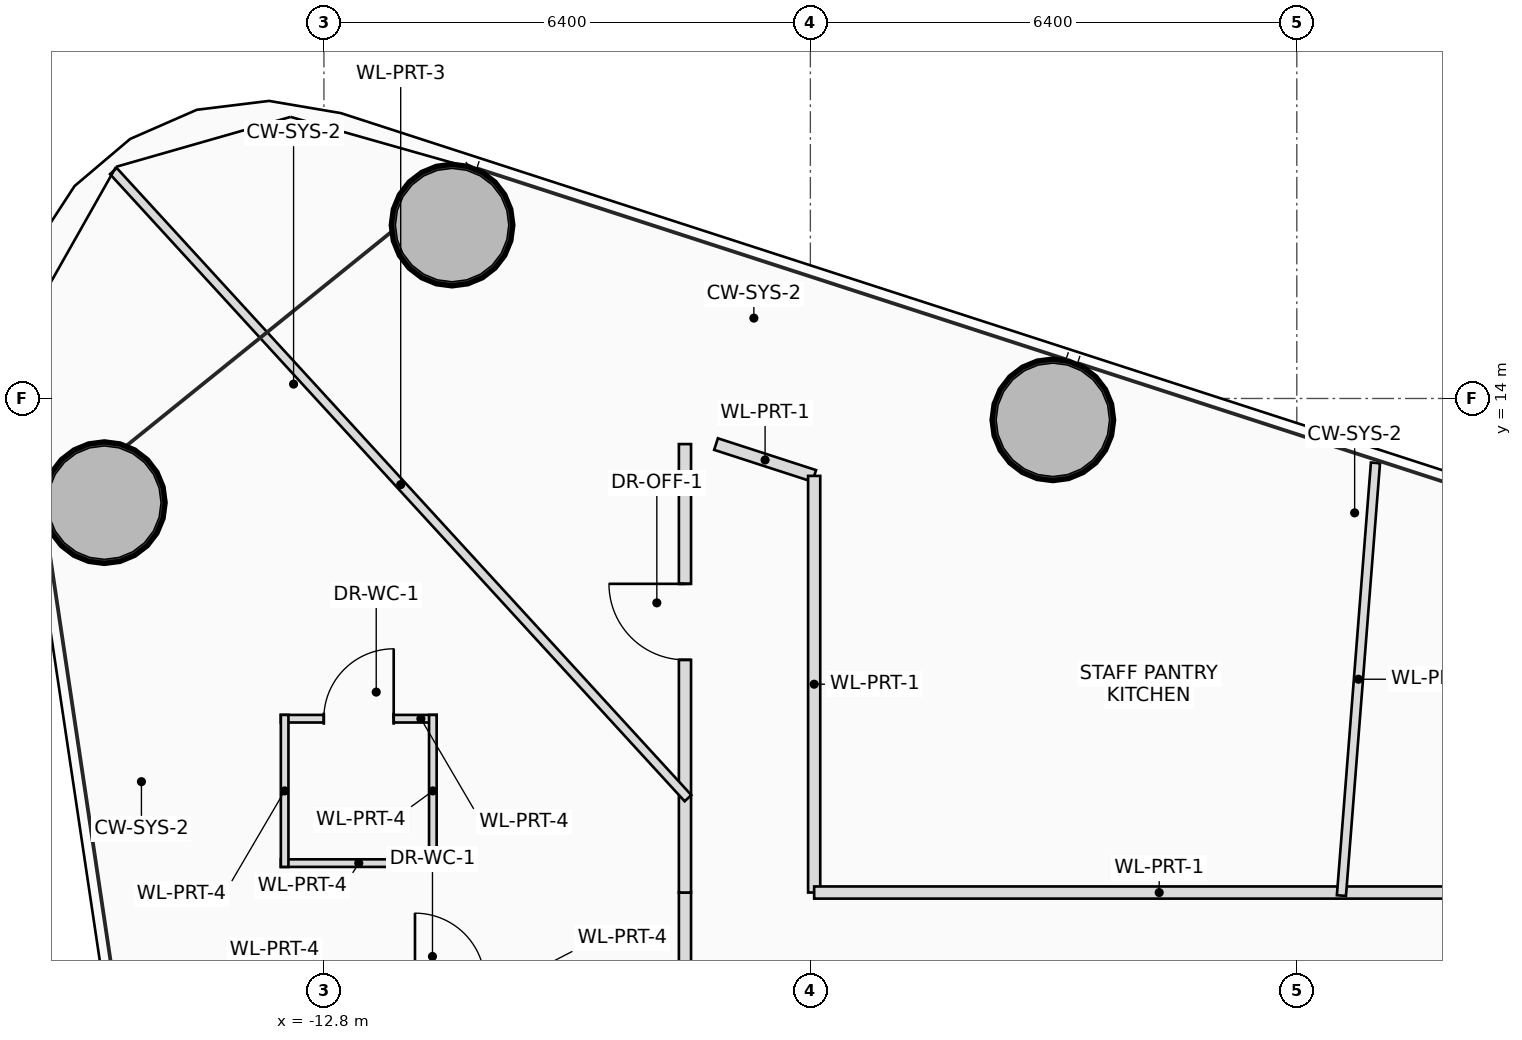
"""IFC4 building model, lengths in metres.
Left out: names, types, materials, properties, quantities, classifications, styles, units other than length and angle.
Written with IfcOpenShell. Run it as: python <this file> out.ifc"""

import sys

from ifc_helpers import new_model, si_unit, direction, frame, frame_2d, origin, origin_2d, place, context, subcontext, project, spatial, rectangle, hollow_circle, extrude, source, transform, mapped, element, fill, save


model = new_model("IFC4")
c1 = context("Model", 3, precision=1e-05, world=origin(), true_north=direction((0.0, 1.0)))
c2 = subcontext(c1, "Body", "Model", "MODEL_VIEW")
j1 = project(units=[si_unit("LENGTHUNIT", "METRE"), si_unit("PLANEANGLEUNIT", "RADIAN")], contexts=[c1])
p1 = place(None, origin())
s1 = spatial("IfcSite", under=j1, at=p1, CompositionType="ELEMENT")
p2 = place(p1, origin())
s2 = spatial("IfcBuilding", under=s1, at=p2, CompositionType="ELEMENT")
p3 = place(p2, frame((0.0, 0.0, 62.3)))
s3 = spatial("IfcBuildingStorey", under=s2, at=p3, CompositionType="ELEMENT", Elevation=62.3)
m1 = source(origin(), c2, "Body", "SweptSolid", [
    extrude(hollow_circle(Radius=0.8, WallThickness=0.055, at=origin_2d()), origin(), (0.0, 0.0, 1.0), 3.75),
])
for number, where, z_axis, x_axis in (
    (1, (-3.21, 13.719, 0.0), (0.0, 0.0, 1.0), (1.0, 0.0, 0.0)),
    (2, (-11.114, 16.281, 0.0), (0.0, 0.0, 1.0), (1.0, 0.0, 0.0)),
    (3, (-15.689, 12.629, 0.0), (0.0, 0.0, 1.0), (1.0, 0.0, 0.0)),
):
    element("IfcColumn", number, at=place(p3, frame(where, z_axis=z_axis, x_axis=x_axis)), inside=s3, PredefinedType="COLUMN", context=c2, shape_type="MappedRepresentation", body=[
        mapped(m1, transform((0.0, 0.0, 0.0), scale=1.0)),
    ])
p4 = place(p3, frame((-13.367, 9.787, 0.0), z_axis=(0.0, 0.0, 1.0), x_axis=(1.0, 0.0, 0.0)))
e4 = element("IfcWall", 4, at=p4, inside=s3, PredefinedType="PARTITIONING", context=c2, shape_type="SweptSolid", body=[
    extrude(rectangle(XDim=2.05, YDim=0.1, at=frame_2d((1.025, 0.0))), origin(), (0.0, 0.0, 1.0), 2.85),
])
p5 = place(p4, frame((0.565, 0.0, 0.0)))
e5 = element("IfcOpeningElement", 5, at=p5, cuts=e4, PredefinedType="OPENING", context=c2, shape_type="SweptSolid", body=[
    extrude(rectangle(XDim=0.92, YDim=2.1, at=frame_2d((0.46, 1.05))), frame((0.0, 0.06, 0.0), z_axis=(0.0, -1.0, 0.0), x_axis=(1.0, 0.0, 0.0)), (0.0, 0.0, 1.0), 0.12),
])
p6 = place(p3, frame((-11.317, 7.887, 0.0), z_axis=(0.0, 0.0, 1.0), x_axis=(-1.0, 0.0, 0.0)))
e6 = element("IfcWall", 6, at=p6, inside=s3, PredefinedType="PARTITIONING", context=c2, shape_type="SweptSolid", body=[
    extrude(rectangle(XDim=2.05, YDim=0.1, at=frame_2d((1.025, 0.0))), origin(), (0.0, 0.0, 1.0), 3.2),
])
p7 = place(p3, frame((-11.367, 9.837, 0.0), z_axis=(0.0, 0.0, 1.0), x_axis=(0.0, -1.0, 0.0)))
e7 = element("IfcWall", 7, at=p7, inside=s3, PredefinedType="PARTITIONING", context=c2, shape_type="SweptSolid", body=[
    extrude(rectangle(XDim=2.0, YDim=0.1, at=frame_2d((1.0, 0.0))), origin(), (0.0, 0.0, 1.0), 2.85),
])
p8 = place(p3, frame((-13.317, 7.837, 0.0), z_axis=(0.0, 0.0, 1.0), x_axis=(0.0, 1.0, 0.0)))
e8 = element("IfcWall", 8, at=p8, inside=s3, PredefinedType="PARTITIONING", context=c2, shape_type="SweptSolid", body=[
    extrude(rectangle(XDim=2.0, YDim=0.1, at=frame_2d((1.0, 0.0))), origin(), (0.0, 0.0, 1.0), 3.545),
])
p9 = place(p3, frame((-8.05, -7.5, 0.0), z_axis=(0.0, 0.0, 1.0), x_axis=(0.0, 1.0, 0.0)))
e9 = element("IfcWall", 9, at=p9, inside=s3, PredefinedType="PARTITIONING", context=c2, shape_type="SweptSolid", body=[
    extrude(rectangle(XDim=15.0, YDim=0.16, at=frame_2d((7.5, 0.0))), origin(), (0.0, 0.0, 1.0), 2.85),
])
p10 = place(p9, frame((8.806, 0.0, 0.0)))
e10 = element("IfcOpeningElement", 10, at=p10, cuts=e9, PredefinedType="OPENING", context=c2, shape_type="SweptSolid", body=[
    extrude(rectangle(XDim=1.0, YDim=2.25, at=frame_2d((0.5, 1.125))), frame((0.0, 0.09, 0.0), z_axis=(0.0, -1.0, 0.0), x_axis=(1.0, 0.0, 0.0)), (0.0, 0.0, 1.0), 0.18),
])
p11 = place(p3, frame((-8.05, 7.5, 0.0), z_axis=(0.0, 0.0, 1.0), x_axis=(0.0, 1.0, 0.0)))
e11 = element("IfcWall", 11, at=p11, inside=s3, PredefinedType="PARTITIONING", context=c2, shape_type="SweptSolid", body=[
    extrude(rectangle(XDim=5.9, YDim=0.16, at=frame_2d((2.95, 0.0))), origin(), (0.0, 0.0, 1.0), 2.85),
])
p12 = place(p11, frame((3.061, 0.0, 0.0)))
e12 = element("IfcOpeningElement", 12, at=p12, cuts=e11, PredefinedType="OPENING", context=c2, shape_type="SweptSolid", body=[
    extrude(rectangle(XDim=1.0, YDim=2.25, at=frame_2d((0.5, 1.125))), frame((0.0, 0.09, 0.0), z_axis=(0.0, -1.0, 0.0), x_axis=(1.0, 0.0, 0.0)), (0.0, 0.0, 1.0), 0.18),
])
p13 = place(p3, frame((-7.641, 13.4, 0.0), z_axis=(0.0, 0.0, 1.0), x_axis=(0.951277022007, -0.308337521884, 0.0)))
e13 = element("IfcWall", 13, at=p13, inside=s3, PredefinedType="PARTITIONING", context=c2, shape_type="SweptSolid", body=[
    extrude(rectangle(XDim=1.357, YDim=0.16, at=frame_2d((0.679, 0.0))), origin(), (0.0, 0.0, 1.0), 3.545),
])
p14 = place(p3, frame((-6.35, 12.981, 0.0), z_axis=(0.0, 0.0, 1.0), x_axis=(0.0, -1.0, 0.0)))
e14 = element("IfcWall", 14, at=p14, inside=s3, PredefinedType="PARTITIONING", context=c2, shape_type="SweptSolid", body=[
    extrude(rectangle(XDim=5.481, YDim=0.16, at=frame_2d((2.741, 0.0))), origin(), (0.0, 0.0, 1.0), 3.05),
])
p15 = place(p3, frame((-6.35, 7.5, 0.0), z_axis=(0.0, 0.0, 1.0), x_axis=(1.0, 0.0, 0.0)))
e15 = element("IfcWall", 15, at=p15, inside=s3, PredefinedType="PARTITIONING", context=c2, shape_type="SweptSolid", body=[
    extrude(rectangle(XDim=12.7, YDim=0.16, at=frame_2d((6.35, 0.0))), origin(), (0.0, 0.0, 1.0), 2.85),
])
p16 = place(p15, frame((9.229, 0.0, 0.0)))
e16 = element("IfcOpeningElement", 16, at=p16, cuts=e15, PredefinedType="OPENING", context=c2, shape_type="SweptSolid", body=[
    extrude(rectangle(XDim=1.0, YDim=2.25, at=frame_2d((0.5, 1.125))), frame((0.0, 0.09, 0.0), z_axis=(0.0, -1.0, 0.0), x_axis=(1.0, 0.0, 0.0)), (0.0, 0.0, 1.0), 0.18),
])
p17 = place(p3, frame((0.587, 7.46, 0.0), z_axis=(0.0, 0.0, 1.0), x_axis=(0.078455369282, 0.996917627004, 0.0)))
e17 = element("IfcWall", 17, at=p17, inside=s3, PredefinedType="PARTITIONING", context=c2, shape_type="SweptSolid", body=[
    extrude(rectangle(XDim=5.71, YDim=0.12, at=frame_2d((2.855, 0.0))), origin(), (0.0, 0.0, 1.0), 3.01),
])
p18 = place(p3, frame((-8.01, 8.741, 0.0), z_axis=(0.0, 0.0, 1.0), x_axis=(-0.675595196102, 0.737272765674, 0.0)))
e18 = element("IfcWall", 18, at=p18, inside=s3, PredefinedType="PARTITIONING", context=c2, shape_type="SweptSolid", body=[
    extrude(rectangle(XDim=11.19, YDim=0.12, at=frame_2d((5.595, 0.0))), origin(), (0.0, 0.0, 1.0), 3.01),
])
p19 = place(p5, origin())
e19 = element("IfcDoor", 19, at=p19, inside=s3, OperationType="SINGLE_SWING_RIGHT", PredefinedType="DOOR", context=c2, shape_type="SweptSolid", body=[
    extrude(rectangle(XDim=0.92, YDim=2.1, at=frame_2d((0.46, 1.05))), frame((0.0, 0.025, 0.0), z_axis=(0.0, -1.0, 0.0), x_axis=(1.0, 0.0, 0.0)), (0.0, 0.0, 1.0), 0.05),
])
fill(e5, e19)
p20 = place(p12, origin())
e20 = element("IfcDoor", 20, at=p20, inside=s3, OperationType="SINGLE_SWING_RIGHT", PredefinedType="DOOR", context=c2, shape_type="SweptSolid", body=[
    extrude(rectangle(XDim=1.0, YDim=2.25, at=frame_2d((0.5, 1.125))), frame((0.0, 0.025, 0.0), z_axis=(0.0, -1.0, 0.0), x_axis=(1.0, 0.0, 0.0)), (0.0, 0.0, 1.0), 0.05),
])
fill(e12, e20)
save(model, sys.argv[1])
